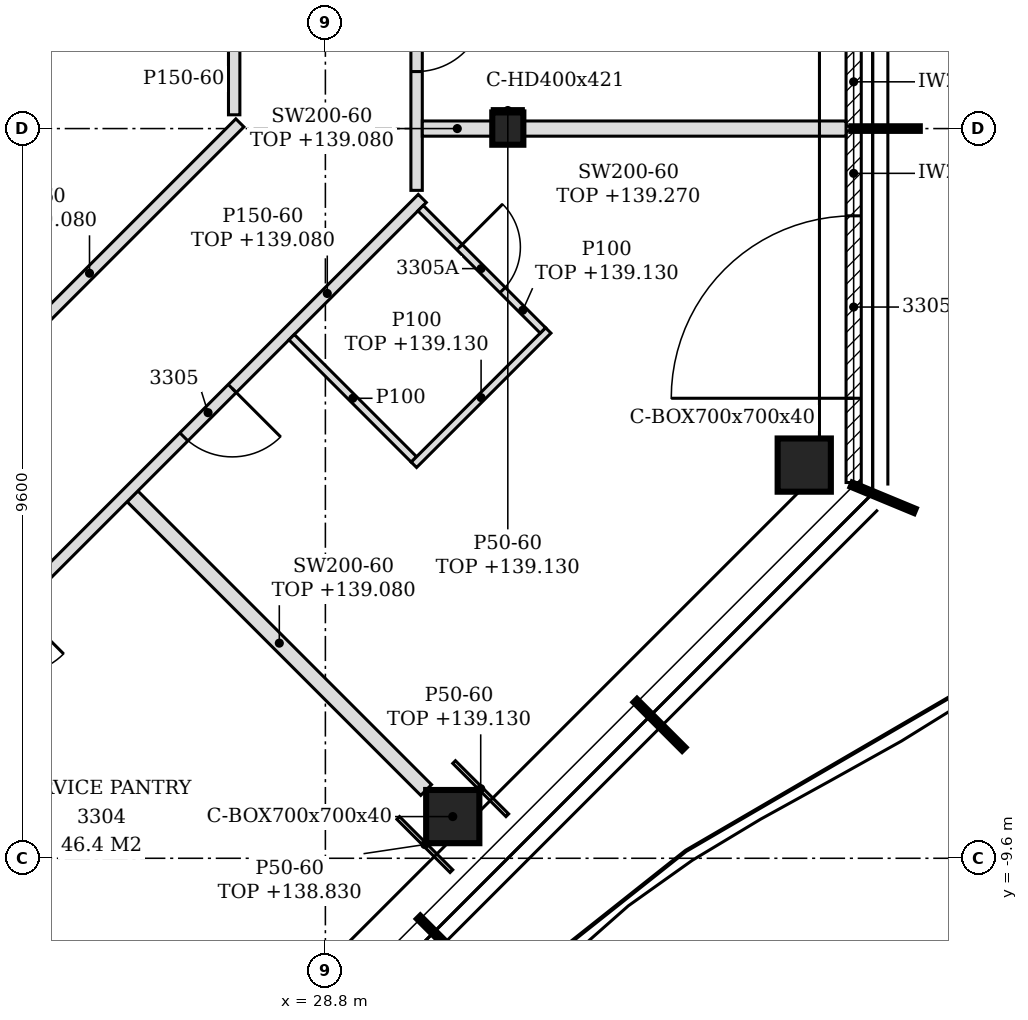
"""IFC4 building model, lengths in metres.
Left out: names, types, materials, properties, quantities, classifications, styles, units other than length and angle.
Written with IfcOpenShell. Run it as: python <this file> out.ifc"""

import sys

from ifc_helpers import new_model, si_unit, direction, frame, frame_2d, origin, origin_2d, place, context, subcontext, project, spatial, polyline, rectangle, hollow_rectangle, i_section, outline, extrude, element, fill, save


model = new_model("IFC4")
c1 = context("Model", 3, precision=1e-05, world=origin(), true_north=direction((0.0, 1.0)))
c2 = subcontext(c1, "Body", "Model", "MODEL_VIEW")
j1 = project(units=[si_unit("LENGTHUNIT", "METRE"), si_unit("PLANEANGLEUNIT", "RADIAN")], contexts=[c1])
p1 = place(None, origin())
s1 = spatial("IfcSite", under=j1, at=p1, CompositionType="ELEMENT")
p2 = place(p1, origin())
s2 = spatial("IfcBuilding", under=s1, at=p2, CompositionType="ELEMENT")
p3 = place(p2, frame((0.0, 0.0, 136.2)))
s3 = spatial("IfcBuildingStorey", under=s2, at=p3, CompositionType="ELEMENT", Elevation=136.2)
for number, where, z_axis, x_axis in (
    (1, (30.476, -9.052, -0.15), (0.0, 0.0, 1.0), (1.0, 0.0, 0.0)),
    (2, (35.1, -4.427, -0.15), (0.0, 0.0, 1.0), (1.0, 0.0, 0.0)),
):
    element("IfcColumn", number, at=place(p3, frame(where, z_axis=z_axis, x_axis=x_axis)), inside=s3, PredefinedType="COLUMN", context=c2, shape_type="SweptSolid", body=[
        extrude(hollow_rectangle(XDim=0.7, YDim=0.7, WallThickness=0.04, at=origin_2d()), origin(), (0.0, 0.0, 1.0), 3.6),
    ])
p4 = place(p3, frame((31.2, 0.0, -0.15), z_axis=(0.0, 0.0, 1.0), x_axis=(1.0, 0.0, 0.0)))
e3 = element("IfcColumn", 3, at=p4, inside=s3, PredefinedType="COLUMN", context=c2, shape_type="SweptSolid", body=[
    extrude(i_section(OverallWidth=0.409, OverallDepth=0.425, WebThickness=0.033, FlangeThickness=0.052, FilletRadius=0.015, at=origin_2d()), origin(), (0.0, 0.0, 1.0), 3.6),
])
p5 = place(p3, frame((35.75, -4.656, 0.0), z_axis=(0.0, 0.0, 1.0), x_axis=(0.0, 1.0, 0.0)))
e4 = element("IfcWall", 4, at=p5, inside=s3, PredefinedType="NOTDEFINED", context=c2, shape_type="SweptSolid", body=[
    extrude(rectangle(XDim=4.626, YDim=0.2, at=frame_2d((2.313, 0.0))), origin(), (0.0, 0.0, 1.0), 3.45),
])
p6 = place(p5, frame((1.108, 0.0, 0.0)))
e5 = element("IfcOpeningElement", 5, at=p6, cuts=e4, PredefinedType="OPENING", context=c2, shape_type="SweptSolid", body=[
    extrude(rectangle(XDim=2.4, YDim=2.4, at=frame_2d((1.2, 1.2))), frame((0.0, 0.11, 0.0), z_axis=(0.0, -1.0, 0.0), x_axis=(1.0, 0.0, 0.0)), (0.0, 0.0, 1.0), 0.22),
])
p7 = place(p3, frame((35.75, 0.03, 0.0), z_axis=(0.0, 0.0, 1.0), x_axis=(0.0, 1.0, 0.0)))
e6 = element("IfcWall", 6, at=p7, inside=s3, PredefinedType="NOTDEFINED", context=c2, shape_type="SweptSolid", body=[
    extrude(rectangle(XDim=4.74, YDim=0.2, at=frame_2d((2.37, 0.0))), origin(), (0.0, 0.0, 1.0), 3.45),
])
p8 = place(p7, frame((1.17, 0.0, 0.0)))
e7 = element("IfcOpeningElement", 7, at=p8, cuts=e6, PredefinedType="OPENING", context=c2, shape_type="SweptSolid", body=[
    extrude(rectangle(XDim=2.4, YDim=2.4, at=frame_2d((1.2, 1.2))), frame((0.0, 0.11, 0.0), z_axis=(0.0, -1.0, 0.0), x_axis=(1.0, 0.0, 0.0)), (0.0, 0.0, 1.0), 0.22),
])
p9 = place(p3, frame((25.502, -13.326, 0.0), z_axis=(0.0, 0.0, 1.0), x_axis=(-0.707106781187, 0.707106781187, 0.0)))
e8 = element("IfcWall", 8, at=p9, inside=s3, PredefinedType="PARTITIONING", context=c2, shape_type="SweptSolid", body=[
    extrude(rectangle(XDim=6.76, YDim=0.2, at=frame_2d((3.38, 0.0))), origin(), (0.0, 0.0, 1.0), 2.93),
])
p10 = place(p3, frame((30.125, -8.702, 0.0), z_axis=(0.0, 0.0, 1.0), x_axis=(-0.707084440093, 0.707129121574, 0.0)))
e9 = element("IfcWall", 9, at=p10, inside=s3, PredefinedType="PARTITIONING", context=c2, shape_type="SweptSolid", body=[
    extrude(rectangle(XDim=5.464, YDim=0.2, at=frame_2d((2.732, 0.0))), origin(), (0.0, 0.0, 1.0), 2.88),
])
p11 = place(p3, frame((22.722, -8.272, 0.0), z_axis=(0.0, 0.0, 1.0), x_axis=(0.707106781187, 0.707106781187, 0.0)))
e10 = element("IfcWall", 10, at=p11, inside=s3, PredefinedType="PARTITIONING", context=c2, shape_type="SweptSolid", body=[
    extrude(rectangle(XDim=10.399, YDim=0.15, at=frame_2d((5.199, 0.0))), origin(), (0.0, 0.0, 1.0), 2.88),
])
p12 = place(p11, frame((1.925, 0.0, 0.0)))
e11 = element("IfcOpeningElement", 11, at=p12, cuts=e10, PredefinedType="OPENING", context=c2, shape_type="SweptSolid", body=[
    extrude(rectangle(XDim=0.9, YDim=2.1, at=frame_2d((0.45, 1.05))), frame((0.0, 0.085, 0.0), z_axis=(0.0, -1.0, 0.0), x_axis=(1.0, 0.0, 0.0)), (0.0, 0.0, 1.0), 0.17),
])
p13 = place(p11, frame((5.963, 0.0, 0.0)))
e12 = element("IfcOpeningElement", 12, at=p13, cuts=e10, PredefinedType="OPENING", context=c2, shape_type="SweptSolid", body=[
    extrude(rectangle(XDim=0.9, YDim=2.1, at=frame_2d((0.45, 1.05))), frame((0.0, 0.085, 0.0), z_axis=(0.0, -1.0, 0.0), x_axis=(1.0, 0.0, 0.0)), (0.0, 0.0, 1.0), 0.17),
])
p14 = place(p3, frame((19.408, -8.191, 0.0), z_axis=(0.0, 0.0, 1.0), x_axis=(0.707117222888, 0.707096339331, 0.0)))
e13 = element("IfcWall", 13, at=p14, inside=s3, PredefinedType="PARTITIONING", context=c2, shape_type="SweptSolid", body=[
    extrude(rectangle(XDim=11.691, YDim=0.15, at=frame_2d((5.845, 0.0))), origin(), (0.0, 0.0, 1.0), 2.88),
])
p15 = place(p14, frame((5.195, 0.0, 0.0)))
e14 = element("IfcOpeningElement", 14, at=p15, cuts=e13, PredefinedType="OPENING", context=c2, shape_type="SweptSolid", body=[
    extrude(rectangle(XDim=0.9, YDim=2.1, at=frame_2d((0.45, 1.05))), frame((0.0, 0.085, 0.0), z_axis=(0.0, -1.0, 0.0), x_axis=(1.0, 0.0, 0.0)), (0.0, 0.0, 1.0), 0.17),
])
p16 = place(p3, frame((29.965, -4.353, 0.0), z_axis=(0.0, 0.0, 1.0), x_axis=(-0.707106781187, 0.707106781187, 0.0)))
e15 = element("IfcWall", 15, at=p16, inside=s3, PredefinedType="PARTITIONING", context=c2, shape_type="SweptSolid", body=[
    extrude(rectangle(XDim=2.275, YDim=0.1, at=frame_2d((1.137, 0.0))), origin(), (0.0, 0.0, 1.0), 3.45),
])
p17 = place(p3, frame((29.965, -4.423, 0.0), z_axis=(0.0, 0.0, 1.0), x_axis=(0.707155609469, 0.707057949532, 0.0)))
e16 = element("IfcWall", 16, at=p17, inside=s3, PredefinedType="PARTITIONING", context=c2, shape_type="SweptSolid", body=[
    extrude(rectangle(XDim=2.5, YDim=0.1, at=frame_2d((1.25, 0.0))), origin(), (0.0, 0.0, 1.0), 2.93),
])
p18 = place(p3, frame((31.662, -2.656, 0.0), z_axis=(0.0, 0.0, 1.0), x_axis=(-0.707160441348, 0.707053116953, 0.0)))
e17 = element("IfcWall", 17, at=p18, inside=s3, PredefinedType="PARTITIONING", context=c2, shape_type="SweptSolid", body=[
    extrude(rectangle(XDim=2.275, YDim=0.1, at=frame_2d((1.137, 0.0))), origin(), (0.0, 0.0, 1.0), 2.93),
])
p19 = place(p18, frame((0.75, 0.0, 0.0)))
e18 = element("IfcOpeningElement", 18, at=p19, cuts=e17, PredefinedType="OPENING", context=c2, shape_type="SweptSolid", body=[
    extrude(rectangle(XDim=0.8, YDim=2.1, at=frame_2d((0.4, 1.05))), frame((0.0, 0.06, 0.0), z_axis=(0.0, -1.0, 0.0), x_axis=(1.0, 0.0, 0.0)), (0.0, 0.0, 1.0), 0.12),
])
p20 = place(p3, frame((30.0, -0.813, 0.0), z_axis=(0.0, 0.0, 1.0), x_axis=(0.0, 1.0, 0.0)))
e19 = element("IfcWall", 19, at=p20, inside=s3, PredefinedType="PARTITIONING", context=c2, shape_type="SweptSolid", body=[
    extrude(outline(polyline([(0.0, 0.0), (12.834, 0.0), (12.834, 3.45), (10.518, 3.45), (10.516, 2.88), (10.308, 2.88), (10.306, 3.45), (5.718, 3.45), (5.716, 2.88), (5.508, 2.88), (5.506, 3.45), (0.918, 3.45), (0.916, 2.88), (0.708, 2.88), (0.706, 3.45), (0.0, 3.45), (0.0, 0.0)])), frame((0.0, 0.075, 0.0), z_axis=(0.0, -1.0, 0.0), x_axis=(1.0, 0.0, 0.0)), (0.0, 0.0, 1.0), 0.15),
])
p21 = place(p20, frame((1.563, 0.0, 0.0)))
e20 = element("IfcOpeningElement", 20, at=p21, cuts=e19, PredefinedType="OPENING", context=c2, shape_type="SweptSolid", body=[
    extrude(rectangle(XDim=0.9, YDim=2.1, at=frame_2d((0.45, 1.05))), frame((0.0, 0.085, 0.0), z_axis=(0.0, -1.0, 0.0), x_axis=(1.0, 0.0, 0.0)), (0.0, 0.0, 1.0), 0.17),
])
p22 = place(p20, frame((8.763, 0.0, 0.0)))
e21 = element("IfcOpeningElement", 21, at=p22, cuts=e19, PredefinedType="OPENING", context=c2, shape_type="SweptSolid", body=[
    extrude(rectangle(XDim=0.9, YDim=2.1, at=frame_2d((0.45, 1.05))), frame((0.0, 0.085, 0.0), z_axis=(0.0, -1.0, 0.0), x_axis=(1.0, 0.0, 0.0)), (0.0, 0.0, 1.0), 0.17),
])
p23 = place(p20, frame((11.121, 0.0, 0.0)))
e22 = element("IfcOpeningElement", 22, at=p23, cuts=e19, PredefinedType="OPENING", context=c2, shape_type="SweptSolid", body=[
    extrude(rectangle(XDim=0.9, YDim=2.1, at=frame_2d((0.45, 1.05))), frame((0.0, 0.085, 0.0), z_axis=(0.0, -1.0, 0.0), x_axis=(1.0, 0.0, 0.0)), (0.0, 0.0, 1.0), 0.17),
])
p24 = place(p3, frame((30.075, 0.0, 0.0), z_axis=(0.0, 0.0, 1.0), x_axis=(1.0, 0.0, 0.0)))
e23 = element("IfcWall", 23, at=p24, inside=s3, PredefinedType="PARTITIONING", context=c2, shape_type="SweptSolid", body=[
    extrude(rectangle(XDim=0.921, YDim=0.2, at=frame_2d((0.46, 0.0))), origin(), (0.0, 0.0, 1.0), 2.88),
])
p25 = place(p3, frame((31.405, 0.0, 0.0), z_axis=(0.0, 0.0, 1.0), x_axis=(1.0, 0.0, 0.0)))
e24 = element("IfcWall", 24, at=p25, inside=s3, PredefinedType="PARTITIONING", context=c2, shape_type="SweptSolid", body=[
    extrude(outline(polyline([(0.0, 0.0), (4.245, 0.0), (4.246, 3.07), (3.845, 3.07), (3.844, 2.93), (3.545, 2.93), (3.543, 3.07), (0.0, 3.07), (0.0, 0.0)])), frame((0.0, 0.1, 0.0), z_axis=(0.0, -1.0, 0.0), x_axis=(1.0, 0.0, 0.0)), (0.0, 0.0, 1.0), 0.2),
])
p26 = place(p3, frame((27.6, 0.181, 0.0), z_axis=(0.0, 0.0, 1.0), x_axis=(0.0, 1.0, 0.0)))
e25 = element("IfcWall", 25, at=p26, inside=s3, PredefinedType="PARTITIONING", context=c2, shape_type="SweptSolid", body=[
    extrude(rectangle(XDim=0.944, YDim=0.15, at=frame_2d((0.472, 0.0))), origin(), (0.0, 0.0, 1.0), 3.45),
])
p27 = place(p3, frame((30.458, -9.769, 0.0), z_axis=(0.0, 0.0, 1.0), x_axis=(-0.706983473703, 0.707230067171, 0.0)))
e26 = element("IfcWall", 26, at=p27, inside=s3, PredefinedType="PARTITIONING", context=c2, shape_type="SweptSolid", body=[
    extrude(rectangle(XDim=0.99, YDim=0.05, at=frame_2d((0.495, 0.0))), origin(), (0.0, 0.0, 1.0), 2.63),
])
p28 = place(p3, frame((31.193, -9.034, 0.0), z_axis=(0.0, 0.0, 1.0), x_axis=(-0.707106781187, 0.707106781187, 0.0)))
e27 = element("IfcWall", 27, at=p28, inside=s3, PredefinedType="PARTITIONING", context=c2, shape_type="SweptSolid", body=[
    extrude(rectangle(XDim=0.99, YDim=0.05, at=frame_2d((0.495, 0.0))), origin(), (0.0, 0.0, 1.0), 2.93),
])
p29 = place(p3, frame((30.996, 0.238, 0.0), z_axis=(0.0, 0.0, 1.0), x_axis=(1.0, 0.0, 0.0)))
e28 = element("IfcWall", 28, at=p29, inside=s3, PredefinedType="PARTITIONING", context=c2, shape_type="SweptSolid", body=[
    extrude(rectangle(XDim=0.409, YDim=0.05, at=frame_2d((0.205, 0.0))), origin(), (0.0, 0.0, 1.0), 2.93),
])
p30 = place(p6, origin())
e29 = element("IfcDoor", 29, at=p30, inside=s3, OperationType="SINGLE_SWING_LEFT", PredefinedType="DOOR", context=c2, shape_type="SweptSolid", body=[
    extrude(rectangle(XDim=2.4, YDim=2.4, at=frame_2d((1.2, 1.2))), frame((0.0, 0.025, 0.0), z_axis=(0.0, -1.0, 0.0), x_axis=(1.0, 0.0, 0.0)), (0.0, 0.0, 1.0), 0.05),
])
fill(e5, e29)
p31 = place(p13, frame((0.9, 0.0, 0.0), z_axis=(0.0, 0.0, 1.0), x_axis=(-1.0, 0.0, 0.0)))
e30 = element("IfcDoor", 30, at=p31, inside=s3, OperationType="SINGLE_SWING_LEFT", PredefinedType="DOOR", context=c2, shape_type="SweptSolid", body=[
    extrude(rectangle(XDim=0.9, YDim=2.1, at=frame_2d((0.45, 1.05))), frame((0.0, 0.025, 0.0), z_axis=(0.0, -1.0, 0.0), x_axis=(1.0, 0.0, 0.0)), (0.0, 0.0, 1.0), 0.05),
])
fill(e12, e30)
p32 = place(p19, frame((0.8, 0.0, 0.0), z_axis=(0.0, 0.0, 1.0), x_axis=(-1.0, 0.0, 0.0)))
e31 = element("IfcDoor", 31, at=p32, inside=s3, OperationType="SINGLE_SWING_LEFT", PredefinedType="DOOR", context=c2, shape_type="SweptSolid", body=[
    extrude(rectangle(XDim=0.8, YDim=2.1, at=frame_2d((0.4, 1.05))), frame((0.0, 0.025, 0.0), z_axis=(0.0, -1.0, 0.0), x_axis=(1.0, 0.0, 0.0)), (0.0, 0.0, 1.0), 0.05),
])
fill(e18, e31)
p33 = place(p21, frame((0.9, 0.0, 0.0), z_axis=(0.0, 0.0, 1.0), x_axis=(-1.0, 0.0, 0.0)))
e32 = element("IfcDoor", 32, at=p33, inside=s3, OperationType="SINGLE_SWING_LEFT", PredefinedType="DOOR", context=c2, shape_type="SweptSolid", body=[
    extrude(rectangle(XDim=0.9, YDim=2.1, at=frame_2d((0.45, 1.05))), frame((0.0, 0.025, 0.0), z_axis=(0.0, -1.0, 0.0), x_axis=(1.0, 0.0, 0.0)), (0.0, 0.0, 1.0), 0.05),
])
fill(e20, e32)
save(model, sys.argv[1])
